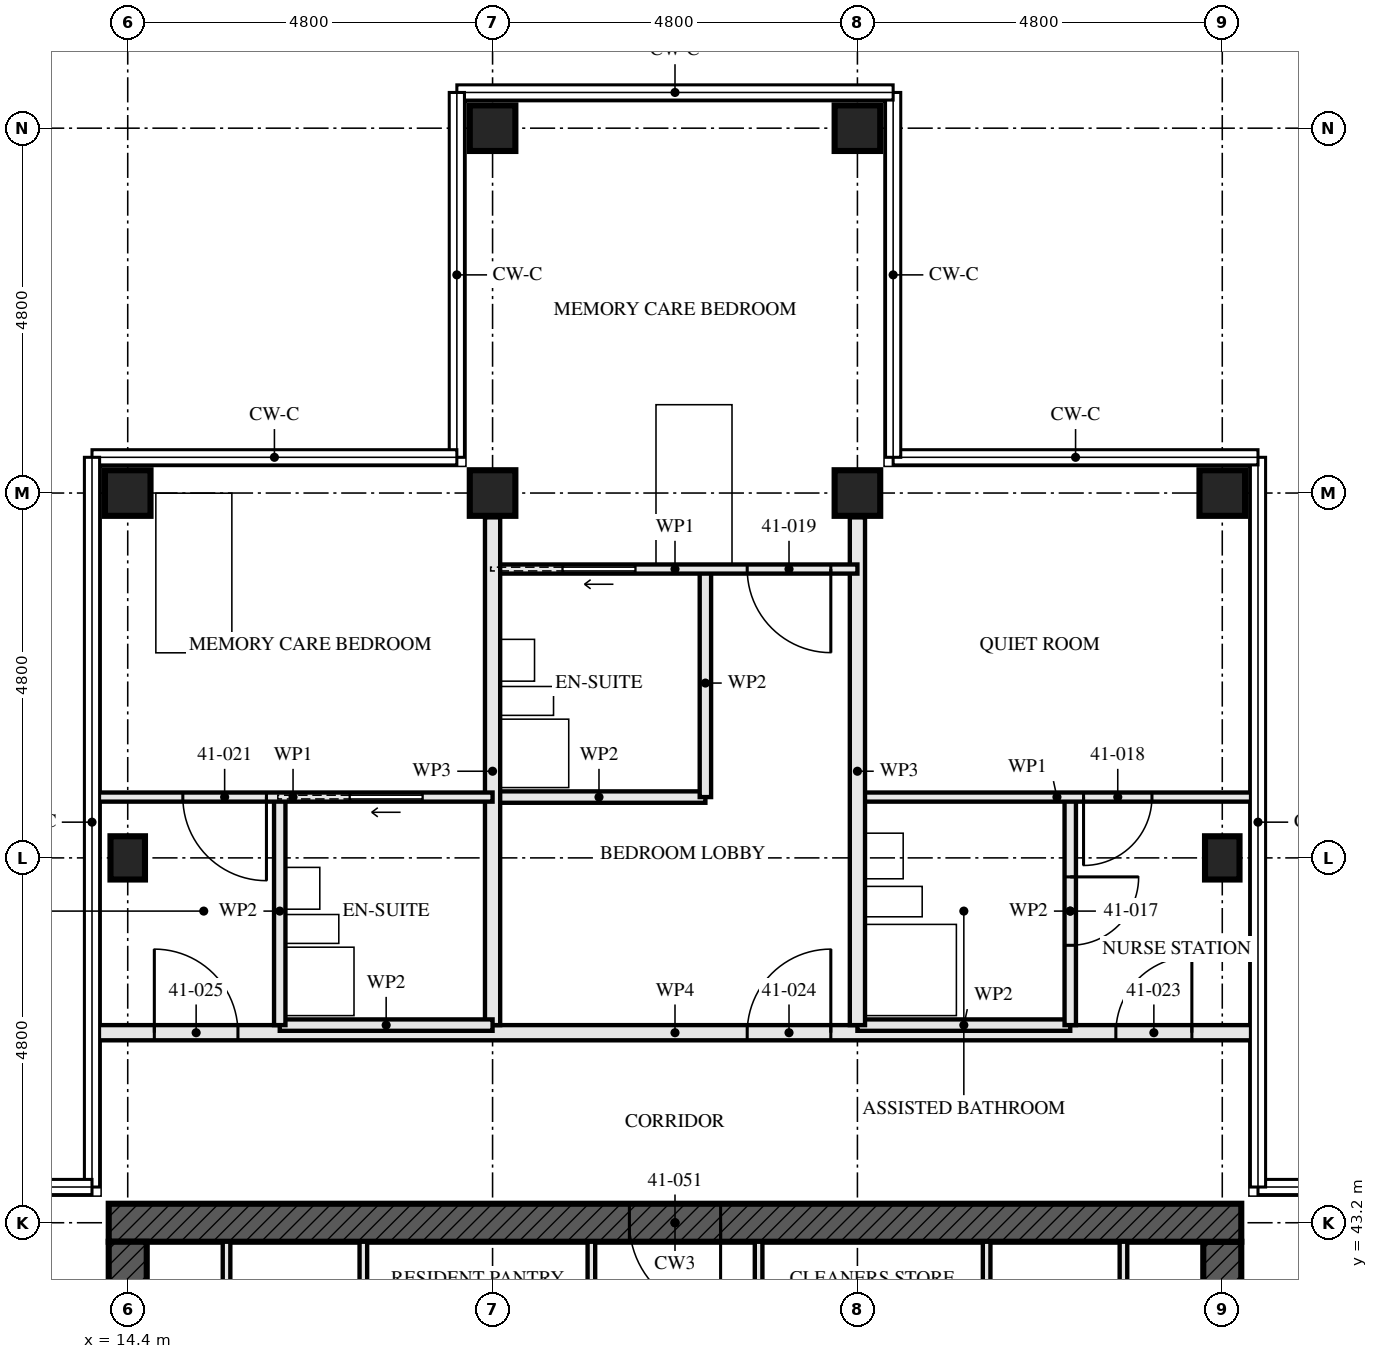
"""IFC4 building model, lengths in metres.
Left out: names, types, materials, properties, quantities, classifications, styles, units other than length and angle.
Written with IfcOpenShell. Run it as: python <this file> out.ifc"""

import sys

from ifc_helpers import new_model, si_unit, direction, frame, frame_2d, origin, origin_2d, place, context, subcontext, project, spatial, rectangle, hollow_rectangle, i_section, extrude, element, fill, save


model = new_model("IFC4")
c1 = context("Model", 3, precision=1e-05, world=origin(), true_north=direction((0.0, 1.0)))
c2 = subcontext(c1, "Body", "Model", "MODEL_VIEW")
j1 = project(units=[si_unit("LENGTHUNIT", "METRE"), si_unit("PLANEANGLEUNIT", "RADIAN")], contexts=[c1])
p1 = place(None, origin())
s1 = spatial("IfcSite", under=j1, at=p1, CompositionType="ELEMENT")
p2 = place(p1, origin())
s2 = spatial("IfcBuilding", under=s1, at=p2, CompositionType="ELEMENT")
p3 = place(p2, frame((0.0, 0.0, 151.5)))
s3 = spatial("IfcBuildingStorey", under=s2, at=p3, CompositionType="ELEMENT", Elevation=151.5)
p4 = place(p3, frame((14.4, 48.0, 0.0), z_axis=(0.0, 0.0, 1.0), x_axis=(1.0, 0.0, 0.0)))
e1 = element("IfcColumn", 1, at=p4, inside=s3, PredefinedType="COLUMN", context=c2, shape_type="SweptSolid", body=[
    extrude(i_section(OverallWidth=0.454, OverallDepth=0.569, WebThickness=0.078, FlangeThickness=0.125, FilletRadius=0.015, at=origin_2d()), origin(), (0.0, 0.0, 1.0), 3.5),
])
for number, where, z_axis, x_axis in (
    (2, (14.4, 52.8, 0.0), (0.0, 0.0, 1.0), (0.0, 1.0, 0.0)),
    (3, (19.2, 52.8, 0.0), (0.0, 0.0, 1.0), (0.0, 1.0, 0.0)),
    (4, (19.2, 57.6, 0.0), (0.0, 0.0, 1.0), (0.0, 1.0, 0.0)),
    (5, (24.0, 52.8, 0.0), (0.0, 0.0, 1.0), (0.0, 1.0, 0.0)),
    (6, (24.0, 57.6, 0.0), (0.0, 0.0, 1.0), (0.0, 1.0, 0.0)),
):
    element("IfcColumn", number, at=place(p3, frame(where, z_axis=z_axis, x_axis=x_axis)), inside=s3, PredefinedType="COLUMN", context=c2, shape_type="SweptSolid", body=[
        extrude(hollow_rectangle(XDim=0.6, YDim=0.6, WallThickness=0.05, at=origin_2d()), origin(), (0.0, 0.0, 1.0), 3.5),
    ])
p5 = place(p3, frame((28.8, 48.0, 0.0), z_axis=(0.0, 0.0, 1.0), x_axis=(1.0, 0.0, 0.0)))
e7 = element("IfcColumn", 7, at=p5, inside=s3, PredefinedType="COLUMN", context=c2, shape_type="SweptSolid", body=[
    extrude(i_section(OverallWidth=0.454, OverallDepth=0.569, WebThickness=0.078, FlangeThickness=0.125, FilletRadius=0.015, at=origin_2d()), origin(), (0.0, 0.0, 1.0), 3.5),
])
p6 = place(p3, frame((28.8, 52.8, 0.0), z_axis=(0.0, 0.0, 1.0), x_axis=(0.0, 1.0, 0.0)))
e8 = element("IfcColumn", 8, at=p6, inside=s3, PredefinedType="COLUMN", context=c2, shape_type="SweptSolid", body=[
    extrude(hollow_rectangle(XDim=0.6, YDim=0.6, WallThickness=0.05, at=origin_2d()), origin(), (0.0, 0.0, 1.0), 3.5),
])
p7 = place(p3, frame((29.05, 43.2, -0.17), z_axis=(0.0, 0.0, 1.0), x_axis=(-1.0, 0.0, 0.0)))
e9 = element("IfcWall", 9, at=p7, inside=s3, PredefinedType="SHEAR", context=c2, shape_type="SweptSolid", body=[
    extrude(rectangle(XDim=14.9, YDim=0.5, at=frame_2d((7.45, 0.0))), origin(), (0.0, 0.0, 1.0), 3.5),
])
p8 = place(p7, frame((6.85, 0.0, 0.17)))
e10 = element("IfcOpeningElement", 10, at=p8, cuts=e9, PredefinedType="OPENING", context=c2, shape_type="SweptSolid", body=[
    extrude(rectangle(XDim=1.2, YDim=2.1, at=frame_2d((0.6, 1.05))), frame((0.0, 0.26, 0.0), z_axis=(0.0, -1.0, 0.0), x_axis=(1.0, 0.0, 0.0)), (0.0, 0.0, 1.0), 0.521),
])
p9 = place(p3, frame((14.4, 42.95, -0.17), z_axis=(0.0, 0.0, 1.0), x_axis=(0.0, -1.0, 0.0)))
e11 = element("IfcWall", 11, at=p9, inside=s3, PredefinedType="SHEAR", context=c2, shape_type="SweptSolid", body=[
    extrude(rectangle(XDim=13.9, YDim=0.5, at=frame_2d((6.95, 0.0))), origin(), (0.0, 0.0, 1.0), 3.5),
])
p10 = place(p9, frame((6.35, 0.0, 0.17)))
e12 = element("IfcOpeningElement", 12, at=p10, cuts=e11, PredefinedType="OPENING", context=c2, shape_type="SweptSolid", body=[
    extrude(rectangle(XDim=1.2, YDim=2.1, at=frame_2d((0.6, 1.05))), frame((0.0, 0.26, 0.0), z_axis=(0.0, -1.0, 0.0), x_axis=(1.0, 0.0, 0.0)), (0.0, 0.0, 1.0), 0.521),
])
p11 = place(p3, frame((28.8, 29.05, -0.17), z_axis=(0.0, 0.0, 1.0), x_axis=(0.0, 1.0, 0.0)))
e13 = element("IfcWall", 13, at=p11, inside=s3, PredefinedType="SHEAR", context=c2, shape_type="SweptSolid", body=[
    extrude(rectangle(XDim=13.9, YDim=0.5, at=frame_2d((6.95, 0.0))), origin(), (0.0, 0.0, 1.0), 3.5),
])
p12 = place(p11, frame((6.35, 0.0, 0.17)))
e14 = element("IfcOpeningElement", 14, at=p12, cuts=e13, PredefinedType="OPENING", context=c2, shape_type="SweptSolid", body=[
    extrude(rectangle(XDim=1.2, YDim=2.1, at=frame_2d((0.6, 1.05))), frame((0.0, 0.26, 0.0), z_axis=(0.0, -1.0, 0.0), x_axis=(1.0, 0.0, 0.0)), (0.0, 0.0, 1.0), 0.521),
])
p13 = place(p3, frame((26.8, 48.8, 0.0), z_axis=(0.0, 0.0, 1.0), x_axis=(0.0, -1.0, 0.0)))
e15 = element("IfcWall", 15, at=p13, inside=s3, PredefinedType="PARTITIONING", context=c2, shape_type="SweptSolid", body=[
    extrude(rectangle(XDim=3.0, YDim=0.15, at=frame_2d((1.5, 0.0))), origin(), (0.0, 0.0, 1.0), 2.55),
])
p14 = place(p13, frame((1.05, 0.0, 0.0)))
e16 = element("IfcOpeningElement", 16, at=p14, cuts=e15, PredefinedType="OPENING", context=c2, shape_type="SweptSolid", body=[
    extrude(rectangle(XDim=0.9, YDim=2.1, at=frame_2d((0.45, 1.05))), frame((0.0, 0.085, 0.0), z_axis=(0.0, -1.0, 0.0), x_axis=(1.0, 0.0, 0.0)), (0.0, 0.0, 1.0), 0.171),
])
p15 = place(p3, frame((26.8, 45.8, 0.0), z_axis=(0.0, 0.0, 1.0), x_axis=(-1.0, 0.0, 0.0)))
e17 = element("IfcWall", 17, at=p15, inside=s3, PredefinedType="PARTITIONING", context=c2, shape_type="SweptSolid", body=[
    extrude(rectangle(XDim=2.8, YDim=0.15, at=frame_2d((1.4, 0.0))), origin(), (0.0, 0.0, 1.0), 3.33),
])
p16 = place(p3, frame((29.25, 48.8, 0.0), z_axis=(0.0, 0.0, 1.0), x_axis=(-1.0, 0.0, 0.0)))
e18 = element("IfcWall", 18, at=p16, inside=s3, PredefinedType="PARTITIONING", context=c2, shape_type="SweptSolid", body=[
    extrude(rectangle(XDim=5.25, YDim=0.12, at=frame_2d((2.625, 0.0))), origin(), (0.0, 0.0, 1.0), 2.32),
])
p17 = place(p16, frame((1.375, 0.0, 0.0)))
e19 = element("IfcOpeningElement", 19, at=p17, cuts=e18, PredefinedType="OPENING", context=c2, shape_type="SweptSolid", body=[
    extrude(rectangle(XDim=0.9, YDim=2.1, at=frame_2d((0.45, 1.05))), frame((0.0, 0.071, 0.0), z_axis=(0.0, -1.0, 0.0), x_axis=(1.0, 0.0, 0.0)), (0.0, 0.0, 1.0), 0.141),
])
p18 = place(p3, frame((24.0, 52.48, 0.0), z_axis=(0.0, 0.0, 1.0), x_axis=(0.0, -1.0, 0.0)))
e20 = element("IfcWall", 20, at=p18, inside=s3, PredefinedType="PARTITIONING", context=c2, shape_type="SweptSolid", body=[
    extrude(rectangle(XDim=6.68, YDim=0.2, at=frame_2d((3.34, 0.0))), origin(), (0.0, 0.0, 1.0), 2.55),
])
p19 = place(p3, frame((22.0, 51.8, 0.0), z_axis=(0.0, 0.0, 1.0), x_axis=(0.0, -1.0, 0.0)))
e21 = element("IfcWall", 21, at=p19, inside=s3, PredefinedType="PARTITIONING", context=c2, shape_type="SweptSolid", body=[
    extrude(rectangle(XDim=3.0, YDim=0.15, at=frame_2d((1.5, 0.0))), origin(), (0.0, 0.0, 1.0), 3.33),
])
p20 = place(p3, frame((22.0, 48.8, 0.0), z_axis=(0.0, 0.0, 1.0), x_axis=(-1.0, 0.0, 0.0)))
e22 = element("IfcWall", 22, at=p20, inside=s3, PredefinedType="PARTITIONING", context=c2, shape_type="SweptSolid", body=[
    extrude(rectangle(XDim=2.8, YDim=0.15, at=frame_2d((1.4, 0.0))), origin(), (0.0, 0.0, 1.0), 3.33),
])
p21 = place(p3, frame((24.0, 51.8, 0.0), z_axis=(0.0, 0.0, 1.0), x_axis=(-1.0, 0.0, 0.0)))
e23 = element("IfcWall", 23, at=p21, inside=s3, PredefinedType="PARTITIONING", context=c2, shape_type="SweptSolid", body=[
    extrude(rectangle(XDim=4.8, YDim=0.12, at=frame_2d((2.4, 0.0))), origin(), (0.0, 0.0, 1.0), 3.33),
])
p22 = place(p21, frame((0.35, 0.0, 0.0)))
e24 = element("IfcOpeningElement", 24, at=p22, cuts=e23, PredefinedType="OPENING", context=c2, shape_type="SweptSolid", body=[
    extrude(rectangle(XDim=1.1, YDim=2.1, at=frame_2d((0.55, 1.05))), frame((0.0, 0.071, 0.0), z_axis=(0.0, -1.0, 0.0), x_axis=(1.0, 0.0, 0.0)), (0.0, 0.0, 1.0), 0.141),
])
p23 = place(p21, frame((2.925, 0.0, 0.0)))
e25 = element("IfcOpeningElement", 25, at=p23, cuts=e23, PredefinedType="OPENING", context=c2, shape_type="SweptSolid", body=[
    extrude(rectangle(XDim=0.95, YDim=2.1, at=frame_2d((0.475, 1.05))), frame((0.0, 0.071, 0.0), z_axis=(0.0, -1.0, 0.0), x_axis=(1.0, 0.0, 0.0)), (0.0, 0.0, 1.0), 0.141),
])
p24 = place(p3, frame((19.2, 52.48, 0.0), z_axis=(0.0, 0.0, 1.0), x_axis=(0.0, -1.0, 0.0)))
e26 = element("IfcWall", 26, at=p24, inside=s3, PredefinedType="PARTITIONING", context=c2, shape_type="SweptSolid", body=[
    extrude(rectangle(XDim=6.68, YDim=0.2, at=frame_2d((3.34, 0.0))), origin(), (0.0, 0.0, 1.0), 2.55),
])
p25 = place(p3, frame((16.4, 48.8, 0.0), z_axis=(0.0, 0.0, 1.0), x_axis=(0.0, -1.0, 0.0)))
e27 = element("IfcWall", 27, at=p25, inside=s3, PredefinedType="PARTITIONING", context=c2, shape_type="SweptSolid", body=[
    extrude(rectangle(XDim=3.0, YDim=0.15, at=frame_2d((1.5, 0.0))), origin(), (0.0, 0.0, 1.0), 2.55),
])
p26 = place(p3, frame((19.2, 45.8, 0.0), z_axis=(0.0, 0.0, 1.0), x_axis=(-1.0, 0.0, 0.0)))
e28 = element("IfcWall", 28, at=p26, inside=s3, PredefinedType="PARTITIONING", context=c2, shape_type="SweptSolid", body=[
    extrude(rectangle(XDim=2.8, YDim=0.15, at=frame_2d((1.4, 0.0))), origin(), (0.0, 0.0, 1.0), 3.33),
])
p27 = place(p3, frame((19.2, 48.8, 0.0), z_axis=(0.0, 0.0, 1.0), x_axis=(-1.0, 0.0, 0.0)))
e29 = element("IfcWall", 29, at=p27, inside=s3, PredefinedType="PARTITIONING", context=c2, shape_type="SweptSolid", body=[
    extrude(rectangle(XDim=5.25, YDim=0.12, at=frame_2d((2.625, 0.0))), origin(), (0.0, 0.0, 1.0), 2.32),
])
p28 = place(p27, frame((2.975, 0.0, 0.0)))
e30 = element("IfcOpeningElement", 30, at=p28, cuts=e29, PredefinedType="OPENING", context=c2, shape_type="SweptSolid", body=[
    extrude(rectangle(XDim=1.1, YDim=2.1, at=frame_2d((0.55, 1.05))), frame((0.0, 0.071, 0.0), z_axis=(0.0, -1.0, 0.0), x_axis=(1.0, 0.0, 0.0)), (0.0, 0.0, 1.0), 0.141),
])
p29 = place(p27, frame((0.925, 0.0, 0.0)))
e31 = element("IfcOpeningElement", 31, at=p29, cuts=e29, PredefinedType="OPENING", context=c2, shape_type="SweptSolid", body=[
    extrude(rectangle(XDim=0.95, YDim=2.1, at=frame_2d((0.475, 1.05))), frame((0.0, 0.071, 0.0), z_axis=(0.0, -1.0, 0.0), x_axis=(1.0, 0.0, 0.0)), (0.0, 0.0, 1.0), 0.141),
])
p30 = place(p3, frame((29.25, 45.7, 0.0), z_axis=(0.0, 0.0, 1.0), x_axis=(-1.0, 0.0, 0.0)))
e32 = element("IfcWall", 32, at=p30, inside=s3, PredefinedType="PARTITIONING", context=c2, shape_type="SweptSolid", body=[
    extrude(rectangle(XDim=15.3, YDim=0.2, at=frame_2d((7.65, 0.0))), origin(), (0.0, 0.0, 1.0), 2.32),
])
p31 = place(p30, frame((0.85, 0.0, 0.0)))
e33 = element("IfcOpeningElement", 33, at=p31, cuts=e32, PredefinedType="OPENING", context=c2, shape_type="SweptSolid", body=[
    extrude(rectangle(XDim=1.0, YDim=2.1, at=frame_2d((0.5, 1.05))), frame((0.0, 0.111, 0.0), z_axis=(0.0, -1.0, 0.0), x_axis=(1.0, 0.0, 0.0)), (0.0, 0.0, 1.0), 0.221),
])
p32 = place(p30, frame((5.6, 0.0, 0.0)))
e34 = element("IfcOpeningElement", 34, at=p32, cuts=e32, PredefinedType="OPENING", context=c2, shape_type="SweptSolid", body=[
    extrude(rectangle(XDim=1.1, YDim=2.1, at=frame_2d((0.55, 1.05))), frame((0.0, 0.111, 0.0), z_axis=(0.0, -1.0, 0.0), x_axis=(1.0, 0.0, 0.0)), (0.0, 0.0, 1.0), 0.221),
])
p33 = place(p30, frame((13.4, 0.0, 0.0)))
e35 = element("IfcOpeningElement", 35, at=p33, cuts=e32, PredefinedType="OPENING", context=c2, shape_type="SweptSolid", body=[
    extrude(rectangle(XDim=1.1, YDim=2.1, at=frame_2d((0.55, 1.05))), frame((0.0, 0.111, 0.0), z_axis=(0.0, -1.0, 0.0), x_axis=(1.0, 0.0, 0.0)), (0.0, 0.0, 1.0), 0.221),
])
for number, where, z_axis, x_axis in (
    (36, (15.7, 37.15, 0.0), (0.0, 0.0, 1.0), (0.0, 1.0, 0.0)),
    (37, (27.5, 37.15, 0.0), (0.0, 0.0, 1.0), (0.0, 1.0, 0.0)),
):
    element("IfcWall", number, at=place(p3, frame(where, z_axis=z_axis, x_axis=x_axis)), inside=s3, PredefinedType="SOLIDWALL", context=c2, shape_type="SweptSolid", body=[
        extrude(rectangle(XDim=5.8, YDim=0.1, at=frame_2d((2.9, 0.0))), origin(), (0.0, 0.0, 1.0), 3.33),
    ])
p34 = place(p3, frame((20.5, 37.15, 0.0), z_axis=(0.0, 0.0, 1.0), x_axis=(0.0, 1.0, 0.0)))
e38 = element("IfcWall", 38, at=p34, inside=s3, PredefinedType="SOLIDWALL", context=c2, shape_type="SweptSolid", body=[
    extrude(rectangle(XDim=5.8, YDim=0.1, at=frame_2d((2.9, 0.0))), origin(), (0.0, 0.0, 1.0), 3.33),
])
p35 = place(p34, frame((0.975, 0.0, 0.0)))
e39 = element("IfcOpeningElement", 39, at=p35, cuts=e38, PredefinedType="OPENING", context=c2, shape_type="SweptSolid", body=[
    extrude(rectangle(XDim=0.9, YDim=2.1, at=frame_2d((0.45, 1.05))), frame((0.0, 0.061, 0.0), z_axis=(0.0, -1.0, 0.0), x_axis=(1.0, 0.0, 0.0)), (0.0, 0.0, 1.0), 0.121),
])
p36 = place(p3, frame((22.7, 37.15, 0.0), z_axis=(0.0, 0.0, 1.0), x_axis=(0.0, 1.0, 0.0)))
e40 = element("IfcWall", 40, at=p36, inside=s3, PredefinedType="SOLIDWALL", context=c2, shape_type="SweptSolid", body=[
    extrude(rectangle(XDim=5.8, YDim=0.1, at=frame_2d((2.9, 0.0))), origin(), (0.0, 0.0, 1.0), 3.33),
])
p37 = place(p36, frame((0.925, 0.0, 0.0)))
e41 = element("IfcOpeningElement", 41, at=p37, cuts=e40, PredefinedType="OPENING", context=c2, shape_type="SweptSolid", body=[
    extrude(rectangle(XDim=1.0, YDim=2.1, at=frame_2d((0.5, 1.05))), frame((0.0, 0.061, 0.0), z_axis=(0.0, -1.0, 0.0), x_axis=(1.0, 0.0, 0.0)), (0.0, 0.0, 1.0), 0.121),
])
for number, where, z_axis, x_axis in (
    (42, (17.5, 37.15, 0.0), (0.0, 0.0, 1.0), (0.0, 1.0, 0.0)),
    (43, (25.7, 37.15, 0.0), (0.0, 0.0, 1.0), (0.0, 1.0, 0.0)),
):
    element("IfcWall", number, at=place(p3, frame(where, z_axis=z_axis, x_axis=x_axis)), inside=s3, PredefinedType="SOLIDWALL", context=c2, shape_type="SweptSolid", body=[
        extrude(rectangle(XDim=5.8, YDim=0.1, at=frame_2d((2.9, 0.0))), origin(), (0.0, 0.0, 1.0), 3.33),
    ])
p38 = place(p14, origin())
e44 = element("IfcDoor", 44, at=p38, inside=s3, OperationType="SINGLE_SWING_RIGHT", PredefinedType="DOOR", context=c2, shape_type="SweptSolid", body=[
    extrude(rectangle(XDim=0.9, YDim=2.1, at=frame_2d((0.45, 1.05))), frame((0.0, 0.022, 0.0), z_axis=(0.0, -1.0, 0.0), x_axis=(1.0, 0.0, 0.0)), (0.0, 0.0, 1.0), 0.044),
])
fill(e16, e44)
p39 = place(p17, origin())
e45 = element("IfcDoor", 45, at=p39, inside=s3, OperationType="SINGLE_SWING_LEFT", PredefinedType="DOOR", context=c2, shape_type="SweptSolid", body=[
    extrude(rectangle(XDim=0.9, YDim=2.1, at=frame_2d((0.45, 1.05))), frame((0.0, 0.022, 0.0), z_axis=(0.0, -1.0, 0.0), x_axis=(1.0, 0.0, 0.0)), (0.0, 0.0, 1.0), 0.044),
])
fill(e19, e45)
p40 = place(p22, origin())
e46 = element("IfcDoor", 46, at=p40, inside=s3, OperationType="SINGLE_SWING_RIGHT", PredefinedType="DOOR", context=c2, shape_type="SweptSolid", body=[
    extrude(rectangle(XDim=1.1, YDim=2.1, at=frame_2d((0.55, 1.05))), frame((0.0, 0.022, 0.0), z_axis=(0.0, -1.0, 0.0), x_axis=(1.0, 0.0, 0.0)), (0.0, 0.0, 1.0), 0.044),
])
fill(e24, e46)
p41 = place(p23, origin())
e47 = element("IfcDoor", 47, at=p41, inside=s3, OperationType="SLIDING_TO_LEFT", PredefinedType="DOOR", context=c2, shape_type="SweptSolid", body=[
    extrude(rectangle(XDim=0.95, YDim=2.1, at=frame_2d((0.475, 1.05))), frame((0.0, 0.022, 0.0), z_axis=(0.0, -1.0, 0.0), x_axis=(1.0, 0.0, 0.0)), (0.0, 0.0, 1.0), 0.044),
])
fill(e25, e47)
p42 = place(p28, origin())
e48 = element("IfcDoor", 48, at=p42, inside=s3, OperationType="SINGLE_SWING_RIGHT", PredefinedType="DOOR", context=c2, shape_type="SweptSolid", body=[
    extrude(rectangle(XDim=1.1, YDim=2.1, at=frame_2d((0.55, 1.05))), frame((0.0, 0.022, 0.0), z_axis=(0.0, -1.0, 0.0), x_axis=(1.0, 0.0, 0.0)), (0.0, 0.0, 1.0), 0.044),
])
fill(e30, e48)
p43 = place(p29, origin())
e49 = element("IfcDoor", 49, at=p43, inside=s3, OperationType="SLIDING_TO_LEFT", PredefinedType="DOOR", context=c2, shape_type="SweptSolid", body=[
    extrude(rectangle(XDim=0.95, YDim=2.1, at=frame_2d((0.475, 1.05))), frame((0.0, 0.022, 0.0), z_axis=(0.0, -1.0, 0.0), x_axis=(1.0, 0.0, 0.0)), (0.0, 0.0, 1.0), 0.044),
])
fill(e31, e49)
p44 = place(p31, frame((1.0, 0.0, 0.0), z_axis=(0.0, 0.0, 1.0), x_axis=(-1.0, 0.0, 0.0)))
e50 = element("IfcDoor", 50, at=p44, inside=s3, OperationType="SINGLE_SWING_LEFT", PredefinedType="DOOR", context=c2, shape_type="SweptSolid", body=[
    extrude(rectangle(XDim=1.0, YDim=2.1, at=frame_2d((0.5, 1.05))), frame((0.0, 0.027, 0.0), z_axis=(0.0, -1.0, 0.0), x_axis=(1.0, 0.0, 0.0)), (0.0, 0.0, 1.0), 0.054),
])
fill(e33, e50)
p45 = place(p32, frame((1.1, 0.0, 0.0), z_axis=(0.0, 0.0, 1.0), x_axis=(-1.0, 0.0, 0.0)))
e51 = element("IfcDoor", 51, at=p45, inside=s3, OperationType="SINGLE_SWING_LEFT", PredefinedType="DOOR", context=c2, shape_type="SweptSolid", body=[
    extrude(rectangle(XDim=1.1, YDim=2.1, at=frame_2d((0.55, 1.05))), frame((0.0, 0.027, 0.0), z_axis=(0.0, -1.0, 0.0), x_axis=(1.0, 0.0, 0.0)), (0.0, 0.0, 1.0), 0.054),
])
fill(e34, e51)
p46 = place(p33, frame((1.1, 0.0, 0.0), z_axis=(0.0, 0.0, 1.0), x_axis=(-1.0, 0.0, 0.0)))
e52 = element("IfcDoor", 52, at=p46, inside=s3, OperationType="SINGLE_SWING_RIGHT", PredefinedType="DOOR", context=c2, shape_type="SweptSolid", body=[
    extrude(rectangle(XDim=1.1, YDim=2.1, at=frame_2d((0.55, 1.05))), frame((0.0, 0.027, 0.0), z_axis=(0.0, -1.0, 0.0), x_axis=(1.0, 0.0, 0.0)), (0.0, 0.0, 1.0), 0.054),
])
fill(e35, e52)
p47 = place(p8, origin())
e53 = element("IfcDoor", 53, at=p47, inside=s3, OperationType="SINGLE_SWING_LEFT", PredefinedType="DOOR", context=c2, shape_type="SweptSolid", body=[
    extrude(rectangle(XDim=1.2, YDim=2.1, at=frame_2d((0.6, 1.05))), frame((0.0, 0.027, 0.0), z_axis=(0.0, -1.0, 0.0), x_axis=(1.0, 0.0, 0.0)), (0.0, 0.0, 1.0), 0.054),
])
fill(e10, e53)
save(model, sys.argv[1])
